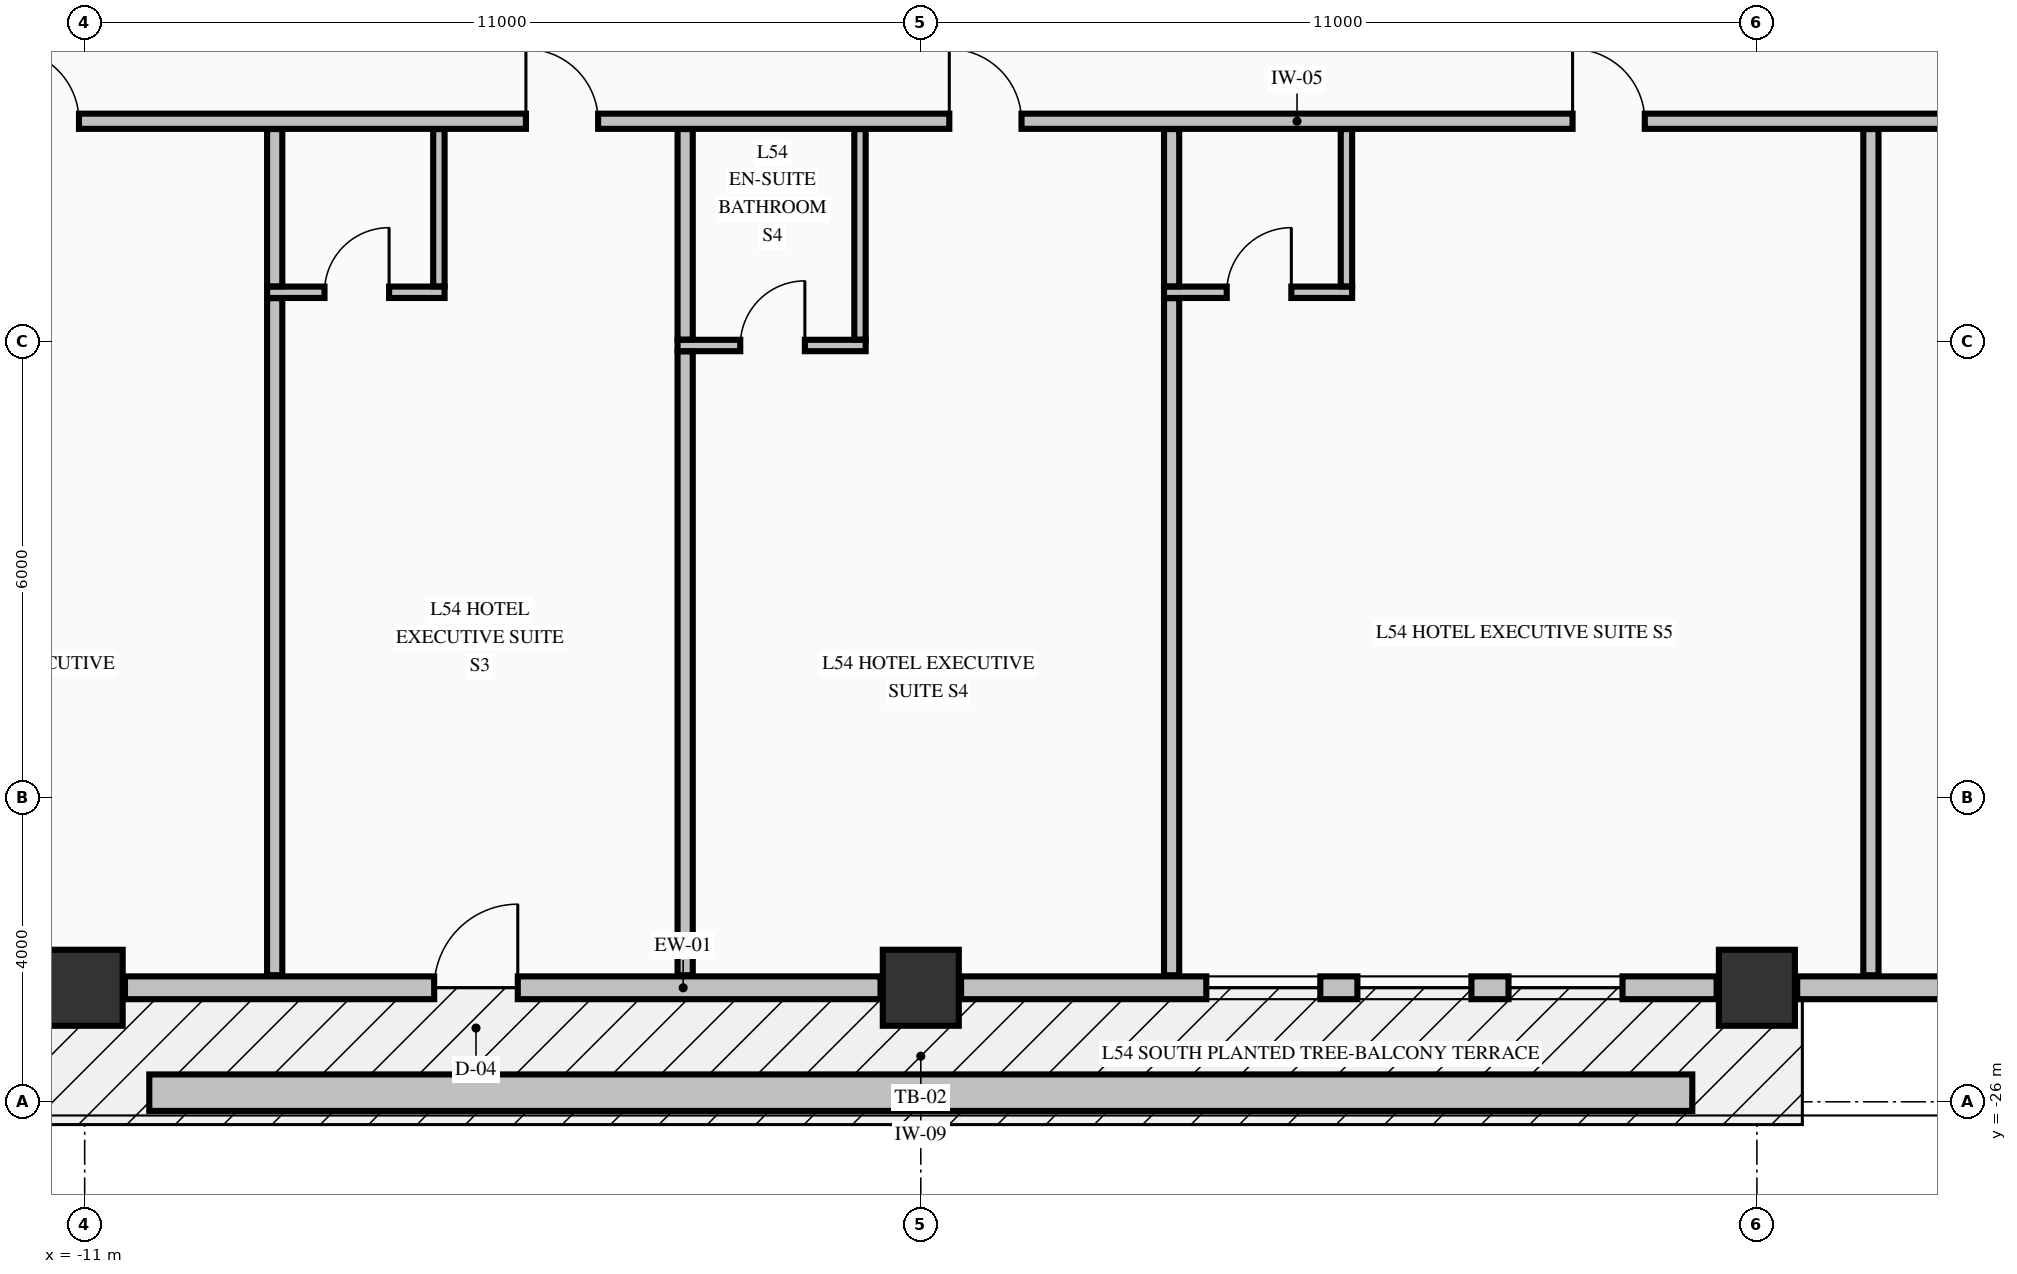
"""IFC4 building model, lengths in metres.
Left out: names, types, materials, properties, quantities, classifications, styles, units other than length and angle.
Written with IfcOpenShell. Run it as: python <this file> out.ifc"""

import sys

from ifc_helpers import new_model, si_unit, direction, frame, frame_2d, origin, origin_2d, place, context, subcontext, project, spatial, rectangle, extrude, element, fill, save


model = new_model("IFC4")
c1 = context("Model", 3, precision=1e-05, world=origin(), true_north=direction((0.0, 1.0)))
c2 = subcontext(c1, "Body", "Model", "MODEL_VIEW")
j1 = project(units=[si_unit("LENGTHUNIT", "METRE"), si_unit("PLANEANGLEUNIT", "RADIAN")], contexts=[c1])
p1 = place(None, origin())
s1 = spatial("IfcSite", under=j1, at=p1, CompositionType="ELEMENT")
p2 = place(p1, origin())
s2 = spatial("IfcBuilding", under=s1, at=p2, CompositionType="ELEMENT")
p3 = place(p2, frame((0.0, 0.0, 208.46)))
s3 = spatial("IfcBuildingStorey", under=s2, at=p3, CompositionType="ELEMENT", Elevation=208.46)
for number, where, z_axis, x_axis in (
    (1, (-11.0, -24.5, -0.25), (0.0, 0.0, 1.0), (1.0, 0.0, 0.0)),
    (2, (0.0, -24.5, -0.25), (0.0, 0.0, 1.0), (1.0, 0.0, 0.0)),
    (3, (11.0, -24.5, -0.25), (0.0, 0.0, 1.0), (1.0, 0.0, 0.0)),
):
    element("IfcColumn", number, at=place(p3, frame(where, z_axis=z_axis, x_axis=x_axis)), inside=s3, PredefinedType="COLUMN", context=c2, shape_type="SweptSolid", body=[
        extrude(rectangle(XDim=1.0, YDim=1.0, at=origin_2d()), origin(), (0.0, 0.0, 1.0), 3.325),
    ])
p4 = place(p3, frame((-10.47, -24.5, 0.0), z_axis=(0.0, 0.0, 1.0), x_axis=(1.0, 0.0, 0.0)))
e4 = element("IfcWall", 4, at=p4, inside=s3, PredefinedType="STANDARD", context=c2, shape_type="SweptSolid", body=[
    extrude(rectangle(XDim=9.94, YDim=0.3, at=frame_2d((4.97, 0.0))), origin(), (0.0, 0.0, 1.0), 2.467),
])
p5 = place(p4, frame((4.068, 0.0, 0.0)))
e5 = element("IfcOpeningElement", 5, at=p5, cuts=e4, PredefinedType="OPENING", context=c2, shape_type="SweptSolid", body=[
    extrude(rectangle(XDim=1.1, YDim=2.15, at=frame_2d((0.55, 1.075))), frame((0.0, 0.16, 0.0), z_axis=(0.0, -1.0, 0.0), x_axis=(1.0, 0.0, 0.0)), (0.0, 0.0, 1.0), 0.32),
])
p6 = place(p3, frame((0.53, -24.5, 0.0), z_axis=(0.0, 0.0, 1.0), x_axis=(1.0, 0.0, 0.0)))
e6 = element("IfcWall", 6, at=p6, inside=s3, PredefinedType="STANDARD", context=c2, shape_type="SweptSolid", body=[
    extrude(rectangle(XDim=9.94, YDim=0.3, at=frame_2d((4.97, 0.0))), origin(), (0.0, 0.0, 1.0), 2.467),
])
p7 = place(p6, frame((3.226, 0.0, 0.72)))
e7 = element("IfcOpeningElement", 7, at=p7, cuts=e6, PredefinedType="OPENING", context=c2, shape_type="SweptSolid", body=[
    extrude(rectangle(XDim=1.5, YDim=1.6, at=frame_2d((0.75, 0.8))), frame((0.0, 0.16, 0.0), z_axis=(0.0, -1.0, 0.0), x_axis=(1.0, 0.0, 0.0)), (0.0, 0.0, 1.0), 0.32),
])
p8 = place(p6, frame((5.214, 0.0, 0.72)))
e8 = element("IfcOpeningElement", 8, at=p8, cuts=e6, PredefinedType="OPENING", context=c2, shape_type="SweptSolid", body=[
    extrude(rectangle(XDim=1.5, YDim=1.6, at=frame_2d((0.75, 0.8))), frame((0.0, 0.16, 0.0), z_axis=(0.0, -1.0, 0.0), x_axis=(1.0, 0.0, 0.0)), (0.0, 0.0, 1.0), 0.32),
])
p9 = place(p6, frame((7.202, 0.0, 0.72)))
e9 = element("IfcOpeningElement", 9, at=p9, cuts=e6, PredefinedType="OPENING", context=c2, shape_type="SweptSolid", body=[
    extrude(rectangle(XDim=1.5, YDim=1.6, at=frame_2d((0.75, 0.8))), frame((0.0, 0.16, 0.0), z_axis=(0.0, -1.0, 0.0), x_axis=(1.0, 0.0, 0.0)), (0.0, 0.0, 1.0), 0.32),
])
p10 = place(p3, frame((11.53, -24.5, 0.0), z_axis=(0.0, 0.0, 1.0), x_axis=(1.0, 0.0, 0.0)))
e10 = element("IfcWall", 10, at=p10, inside=s3, PredefinedType="STANDARD", context=c2, shape_type="SweptSolid", body=[
    extrude(rectangle(XDim=4.94, YDim=0.3, at=frame_2d((2.47, 0.0))), origin(), (0.0, 0.0, 1.0), 2.467),
])
p11 = place(p10, frame((2.543, 0.0, 0.72)))
e11 = element("IfcOpeningElement", 11, at=p11, cuts=e10, PredefinedType="OPENING", context=c2, shape_type="SweptSolid", body=[
    extrude(rectangle(XDim=1.5, YDim=1.6, at=frame_2d((0.75, 0.8))), frame((0.0, 0.16, 0.0), z_axis=(0.0, -1.0, 0.0), x_axis=(1.0, 0.0, 0.0)), (0.0, 0.0, 1.0), 0.32),
])
p12 = place(p3, frame((-3.2, -16.05, 0.0), z_axis=(0.0, 0.0, 1.0), x_axis=(1.0, 0.0, 0.0)))
e12 = element("IfcWall", 12, at=p12, inside=s3, PredefinedType="PARTITIONING", context=c2, shape_type="SweptSolid", body=[
    extrude(rectangle(XDim=2.475, YDim=0.15, at=frame_2d((1.237, 0.0))), origin(), (0.0, 0.0, 1.0), 3.075),
])
p13 = place(p12, frame((0.825, 0.0, 0.0)))
e13 = element("IfcOpeningElement", 13, at=p13, cuts=e12, PredefinedType="OPENING", context=c2, shape_type="SweptSolid", body=[
    extrude(rectangle(XDim=0.85, YDim=2.1, at=frame_2d((0.425, 1.05))), frame((0.0, 0.085, 0.0), z_axis=(0.0, -1.0, 0.0), x_axis=(1.0, 0.0, 0.0)), (0.0, 0.0, 1.0), 0.17),
])
p14 = place(p3, frame((-8.6, -15.35, 0.0), z_axis=(0.0, 0.0, 1.0), x_axis=(1.0, 0.0, 0.0)))
e14 = element("IfcWall", 14, at=p14, inside=s3, PredefinedType="PARTITIONING", context=c2, shape_type="SweptSolid", body=[
    extrude(rectangle(XDim=2.335, YDim=0.15, at=frame_2d((1.167, 0.0))), origin(), (0.0, 0.0, 1.0), 3.075),
])
p15 = place(p14, frame((0.755, 0.0, 0.0)))
e15 = element("IfcOpeningElement", 15, at=p15, cuts=e14, PredefinedType="OPENING", context=c2, shape_type="SweptSolid", body=[
    extrude(rectangle(XDim=0.85, YDim=2.1, at=frame_2d((0.425, 1.05))), frame((0.0, 0.085, 0.0), z_axis=(0.0, -1.0, 0.0), x_axis=(1.0, 0.0, 0.0)), (0.0, 0.0, 1.0), 0.17),
])
p16 = place(p3, frame((3.2, -15.35, 0.0), z_axis=(0.0, 0.0, 1.0), x_axis=(1.0, 0.0, 0.0)))
e16 = element("IfcWall", 16, at=p16, inside=s3, PredefinedType="PARTITIONING", context=c2, shape_type="SweptSolid", body=[
    extrude(rectangle(XDim=2.475, YDim=0.15, at=frame_2d((1.238, 0.0))), origin(), (0.0, 0.0, 1.0), 3.075),
])
p17 = place(p16, frame((0.825, 0.0, 0.0)))
e17 = element("IfcOpeningElement", 17, at=p17, cuts=e16, PredefinedType="OPENING", context=c2, shape_type="SweptSolid", body=[
    extrude(rectangle(XDim=0.85, YDim=2.1, at=frame_2d((0.425, 1.05))), frame((0.0, 0.085, 0.0), z_axis=(0.0, -1.0, 0.0), x_axis=(1.0, 0.0, 0.0)), (0.0, 0.0, 1.0), 0.17),
])
p18 = place(p3, frame((-22.1, -13.1, 0.0), z_axis=(0.0, 0.0, 1.0), x_axis=(1.0, 0.0, 0.0)))
e18 = element("IfcWall", 18, at=p18, inside=s3, PredefinedType="PARTITIONING", context=c2, shape_type="SweptSolid", body=[
    extrude(rectangle(XDim=39.2, YDim=0.2, at=frame_2d((19.6, 0.0))), origin(), (0.0, 0.0, 1.0), 3.075),
])
p19 = place(p18, frame((4.025, 0.0, 0.0)))
e19 = element("IfcOpeningElement", 19, at=p19, cuts=e18, PredefinedType="OPENING", context=c2, shape_type="SweptSolid", body=[
    extrude(rectangle(XDim=0.95, YDim=2.15, at=frame_2d((0.475, 1.075))), frame((0.0, 0.11, 0.0), z_axis=(0.0, -1.0, 0.0), x_axis=(1.0, 0.0, 0.0)), (0.0, 0.0, 1.0), 0.22),
])
p20 = place(p18, frame((10.075, 0.0, 0.0)))
e20 = element("IfcOpeningElement", 20, at=p20, cuts=e18, PredefinedType="OPENING", context=c2, shape_type="SweptSolid", body=[
    extrude(rectangle(XDim=0.95, YDim=2.15, at=frame_2d((0.475, 1.075))), frame((0.0, 0.11, 0.0), z_axis=(0.0, -1.0, 0.0), x_axis=(1.0, 0.0, 0.0)), (0.0, 0.0, 1.0), 0.22),
])
p21 = place(p18, frame((16.905, 0.0, 0.0)))
e21 = element("IfcOpeningElement", 21, at=p21, cuts=e18, PredefinedType="OPENING", context=c2, shape_type="SweptSolid", body=[
    extrude(rectangle(XDim=0.95, YDim=2.15, at=frame_2d((0.475, 1.075))), frame((0.0, 0.11, 0.0), z_axis=(0.0, -1.0, 0.0), x_axis=(1.0, 0.0, 0.0)), (0.0, 0.0, 1.0), 0.22),
])
p22 = place(p18, frame((22.475, 0.0, 0.0)))
e22 = element("IfcOpeningElement", 22, at=p22, cuts=e18, PredefinedType="OPENING", context=c2, shape_type="SweptSolid", body=[
    extrude(rectangle(XDim=0.95, YDim=2.15, at=frame_2d((0.475, 1.075))), frame((0.0, 0.11, 0.0), z_axis=(0.0, -1.0, 0.0), x_axis=(1.0, 0.0, 0.0)), (0.0, 0.0, 1.0), 0.22),
])
p23 = place(p18, frame((30.675, 0.0, 0.0)))
e23 = element("IfcOpeningElement", 23, at=p23, cuts=e18, PredefinedType="OPENING", context=c2, shape_type="SweptSolid", body=[
    extrude(rectangle(XDim=0.95, YDim=2.15, at=frame_2d((0.475, 1.075))), frame((0.0, 0.11, 0.0), z_axis=(0.0, -1.0, 0.0), x_axis=(1.0, 0.0, 0.0)), (0.0, 0.0, 1.0), 0.22),
])
p24 = place(p18, frame((36.325, 0.0, 0.0)))
e24 = element("IfcOpeningElement", 24, at=p24, cuts=e18, PredefinedType="OPENING", context=c2, shape_type="SweptSolid", body=[
    extrude(rectangle(XDim=1.05, YDim=2.15, at=frame_2d((0.525, 1.075))), frame((0.0, 0.11, 0.0), z_axis=(0.0, -1.0, 0.0), x_axis=(1.0, 0.0, 0.0)), (0.0, 0.0, 1.0), 0.22),
])
p25 = place(p3, frame((-8.5, -24.335, 0.0), z_axis=(0.0, 0.0, 1.0), x_axis=(0.0, 1.0, 0.0)))
e25 = element("IfcWall", 25, at=p25, inside=s3, PredefinedType="PARTITIONING", context=c2, shape_type="SweptSolid", body=[
    extrude(rectangle(XDim=8.907, YDim=0.2, at=frame_2d((4.454, 0.0))), origin(), (0.0, 0.0, 1.0), 3.075),
])
p26 = place(p3, frame((-8.5, -15.272, 0.0), z_axis=(0.0, 0.0, 1.0), x_axis=(0.0, 1.0, 0.0)))
e26 = element("IfcWall", 26, at=p26, inside=s3, PredefinedType="PARTITIONING", context=c2, shape_type="SweptSolid", body=[
    extrude(rectangle(XDim=2.069, YDim=0.2, at=frame_2d((1.035, 0.0))), origin(), (0.0, 0.0, 1.0), 3.075),
])
p27 = place(p3, frame((-6.34, -15.272, 0.0), z_axis=(0.0, 0.0, 1.0), x_axis=(0.0, 1.0, 0.0)))
e27 = element("IfcWall", 27, at=p27, inside=s3, PredefinedType="PARTITIONING", context=c2, shape_type="SweptSolid", body=[
    extrude(rectangle(XDim=2.069, YDim=0.15, at=frame_2d((1.035, 0.0))), origin(), (0.0, 0.0, 1.0), 3.075),
])
p28 = place(p3, frame((-3.1, -24.335, 0.0), z_axis=(0.0, 0.0, 1.0), x_axis=(0.0, 1.0, 0.0)))
e28 = element("IfcWall", 28, at=p28, inside=s3, PredefinedType="PARTITIONING", context=c2, shape_type="SweptSolid", body=[
    extrude(rectangle(XDim=8.207, YDim=0.2, at=frame_2d((4.104, 0.0))), origin(), (0.0, 0.0, 1.0), 3.075),
])
p29 = place(p3, frame((-3.1, -15.972, 0.0), z_axis=(0.0, 0.0, 1.0), x_axis=(0.0, 1.0, 0.0)))
e29 = element("IfcWall", 29, at=p29, inside=s3, PredefinedType="PARTITIONING", context=c2, shape_type="SweptSolid", body=[
    extrude(rectangle(XDim=2.769, YDim=0.2, at=frame_2d((1.385, 0.0))), origin(), (0.0, 0.0, 1.0), 3.075),
])
p30 = place(p3, frame((-0.8, -15.972, 0.0), z_axis=(0.0, 0.0, 1.0), x_axis=(0.0, 1.0, 0.0)))
e30 = element("IfcWall", 30, at=p30, inside=s3, PredefinedType="PARTITIONING", context=c2, shape_type="SweptSolid", body=[
    extrude(rectangle(XDim=2.769, YDim=0.15, at=frame_2d((1.385, 0.0))), origin(), (0.0, 0.0, 1.0), 3.075),
])
p31 = place(p3, frame((3.3, -24.335, 0.0), z_axis=(0.0, 0.0, 1.0), x_axis=(0.0, 1.0, 0.0)))
e31 = element("IfcWall", 31, at=p31, inside=s3, PredefinedType="PARTITIONING", context=c2, shape_type="SweptSolid", body=[
    extrude(rectangle(XDim=8.907, YDim=0.2, at=frame_2d((4.454, 0.0))), origin(), (0.0, 0.0, 1.0), 3.075),
])
p32 = place(p3, frame((3.3, -15.272, 0.0), z_axis=(0.0, 0.0, 1.0), x_axis=(0.0, 1.0, 0.0)))
e32 = element("IfcWall", 32, at=p32, inside=s3, PredefinedType="PARTITIONING", context=c2, shape_type="SweptSolid", body=[
    extrude(rectangle(XDim=2.069, YDim=0.2, at=frame_2d((1.035, 0.0))), origin(), (0.0, 0.0, 1.0), 3.075),
])
p33 = place(p3, frame((5.6, -15.272, 0.0), z_axis=(0.0, 0.0, 1.0), x_axis=(0.0, 1.0, 0.0)))
e33 = element("IfcWall", 33, at=p33, inside=s3, PredefinedType="PARTITIONING", context=c2, shape_type="SweptSolid", body=[
    extrude(rectangle(XDim=2.069, YDim=0.15, at=frame_2d((1.035, 0.0))), origin(), (0.0, 0.0, 1.0), 3.075),
])
p34 = place(p3, frame((12.5, -24.335, 0.0), z_axis=(0.0, 0.0, 1.0), x_axis=(0.0, 1.0, 0.0)))
e34 = element("IfcWall", 34, at=p34, inside=s3, PredefinedType="PARTITIONING", context=c2, shape_type="SweptSolid", body=[
    extrude(rectangle(XDim=11.132, YDim=0.2, at=frame_2d((5.566, 0.0))), origin(), (0.0, 0.0, 1.0), 3.075),
])
p35 = place(p3, frame((-10.15, -25.88, -0.04), z_axis=(0.0, 0.0, 1.0), x_axis=(1.0, 0.0, 0.0)))
e35 = element("IfcWall", 35, at=p35, inside=s3, PredefinedType="PARAPET", context=c2, shape_type="SweptSolid", body=[
    extrude(rectangle(XDim=20.3, YDim=0.48, at=frame_2d((10.15, 0.0))), origin(), (0.0, 0.0, 1.0), 0.52),
])
p36 = place(p5, origin())
e36 = element("IfcDoor", 36, at=p36, inside=s3, OperationType="SINGLE_SWING_RIGHT", PredefinedType="DOOR", context=c2, shape_type="SweptSolid", body=[
    extrude(rectangle(XDim=1.1, YDim=2.15, at=frame_2d((0.55, 1.075))), frame((0.0, 0.025, 0.0), z_axis=(0.0, -1.0, 0.0), x_axis=(1.0, 0.0, 0.0)), (0.0, 0.0, 1.0), 0.05),
])
fill(e5, e36)
p37 = place(p7, origin())
e37 = element("IfcWindow", 37, at=p37, inside=s3, PartitioningType="SINGLE_PANEL", PredefinedType="WINDOW", context=c2, shape_type="SweptSolid", body=[
    extrude(rectangle(XDim=1.5, YDim=1.6, at=frame_2d((0.75, 0.8))), frame((0.0, 0.03, 0.0), z_axis=(0.0, -1.0, 0.0), x_axis=(1.0, 0.0, 0.0)), (0.0, 0.0, 1.0), 0.06),
])
fill(e7, e37)
p38 = place(p8, origin())
e38 = element("IfcWindow", 38, at=p38, inside=s3, PartitioningType="SINGLE_PANEL", PredefinedType="WINDOW", context=c2, shape_type="SweptSolid", body=[
    extrude(rectangle(XDim=1.5, YDim=1.6, at=frame_2d((0.75, 0.8))), frame((0.0, 0.03, 0.0), z_axis=(0.0, -1.0, 0.0), x_axis=(1.0, 0.0, 0.0)), (0.0, 0.0, 1.0), 0.06),
])
fill(e8, e38)
p39 = place(p9, origin())
e39 = element("IfcWindow", 39, at=p39, inside=s3, PartitioningType="SINGLE_PANEL", PredefinedType="WINDOW", context=c2, shape_type="SweptSolid", body=[
    extrude(rectangle(XDim=1.5, YDim=1.6, at=frame_2d((0.75, 0.8))), frame((0.0, 0.03, 0.0), z_axis=(0.0, -1.0, 0.0), x_axis=(1.0, 0.0, 0.0)), (0.0, 0.0, 1.0), 0.06),
])
fill(e9, e39)
p40 = place(p20, origin())
e40 = element("IfcDoor", 40, at=p40, inside=s3, OperationType="SINGLE_SWING_LEFT", PredefinedType="DOOR", context=c2, shape_type="SweptSolid", body=[
    extrude(rectangle(XDim=0.95, YDim=2.15, at=frame_2d((0.475, 1.075))), frame((0.0, 0.025, 0.0), z_axis=(0.0, -1.0, 0.0), x_axis=(1.0, 0.0, 0.0)), (0.0, 0.0, 1.0), 0.05),
])
fill(e20, e40)
p41 = place(p21, origin())
e41 = element("IfcDoor", 41, at=p41, inside=s3, OperationType="SINGLE_SWING_LEFT", PredefinedType="DOOR", context=c2, shape_type="SweptSolid", body=[
    extrude(rectangle(XDim=0.95, YDim=2.15, at=frame_2d((0.475, 1.075))), frame((0.0, 0.025, 0.0), z_axis=(0.0, -1.0, 0.0), x_axis=(1.0, 0.0, 0.0)), (0.0, 0.0, 1.0), 0.05),
])
fill(e21, e41)
p42 = place(p15, origin())
e42 = element("IfcDoor", 42, at=p42, inside=s3, OperationType="SINGLE_SWING_RIGHT", PredefinedType="DOOR", context=c2, shape_type="SweptSolid", body=[
    extrude(rectangle(XDim=0.85, YDim=2.1, at=frame_2d((0.425, 1.05))), frame((0.0, 0.025, 0.0), z_axis=(0.0, -1.0, 0.0), x_axis=(1.0, 0.0, 0.0)), (0.0, 0.0, 1.0), 0.05),
])
fill(e15, e42)
p43 = place(p22, origin())
e43 = element("IfcDoor", 43, at=p43, inside=s3, OperationType="SINGLE_SWING_LEFT", PredefinedType="DOOR", context=c2, shape_type="SweptSolid", body=[
    extrude(rectangle(XDim=0.95, YDim=2.15, at=frame_2d((0.475, 1.075))), frame((0.0, 0.025, 0.0), z_axis=(0.0, -1.0, 0.0), x_axis=(1.0, 0.0, 0.0)), (0.0, 0.0, 1.0), 0.05),
])
fill(e22, e43)
p44 = place(p13, origin())
e44 = element("IfcDoor", 44, at=p44, inside=s3, OperationType="SINGLE_SWING_RIGHT", PredefinedType="DOOR", context=c2, shape_type="SweptSolid", body=[
    extrude(rectangle(XDim=0.85, YDim=2.1, at=frame_2d((0.425, 1.05))), frame((0.0, 0.025, 0.0), z_axis=(0.0, -1.0, 0.0), x_axis=(1.0, 0.0, 0.0)), (0.0, 0.0, 1.0), 0.05),
])
fill(e13, e44)
p45 = place(p23, origin())
e45 = element("IfcDoor", 45, at=p45, inside=s3, OperationType="SINGLE_SWING_LEFT", PredefinedType="DOOR", context=c2, shape_type="SweptSolid", body=[
    extrude(rectangle(XDim=0.95, YDim=2.15, at=frame_2d((0.475, 1.075))), frame((0.0, 0.025, 0.0), z_axis=(0.0, -1.0, 0.0), x_axis=(1.0, 0.0, 0.0)), (0.0, 0.0, 1.0), 0.05),
])
fill(e23, e45)
p46 = place(p17, origin())
e46 = element("IfcDoor", 46, at=p46, inside=s3, OperationType="SINGLE_SWING_RIGHT", PredefinedType="DOOR", context=c2, shape_type="SweptSolid", body=[
    extrude(rectangle(XDim=0.85, YDim=2.1, at=frame_2d((0.425, 1.05))), frame((0.0, 0.025, 0.0), z_axis=(0.0, -1.0, 0.0), x_axis=(1.0, 0.0, 0.0)), (0.0, 0.0, 1.0), 0.05),
])
fill(e17, e46)
save(model, sys.argv[1])
